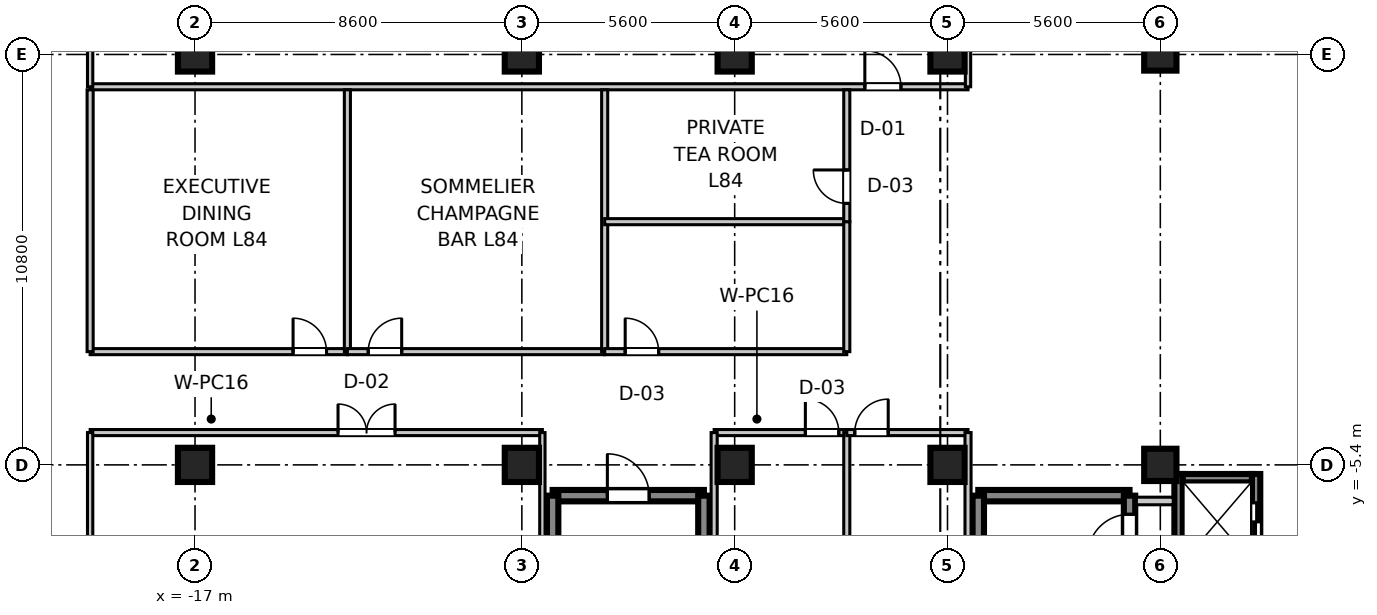
"""IFC4 building model, lengths in metres.
Left out: names, types, materials, properties, quantities, classifications, styles, units other than length and angle.
Written with IfcOpenShell. Run it as: python <this file> out.ifc"""

import sys

from ifc_helpers import new_model, si_unit, direction, frame, frame_2d, origin, origin_2d, place, context, subcontext, project, spatial, rectangle, extrude, source, transform, mapped, element, fill, save


model = new_model("IFC4")
c1 = context("Model", 3, precision=1e-05, world=origin(), true_north=direction((0.0, 1.0)))
c2 = subcontext(c1, "Body", "Model", "MODEL_VIEW")
j1 = project(units=[si_unit("LENGTHUNIT", "METRE"), si_unit("PLANEANGLEUNIT", "RADIAN")], contexts=[c1])
p1 = place(None, origin())
s1 = spatial("IfcSite", under=j1, at=p1, CompositionType="ELEMENT")
p2 = place(p1, origin())
s2 = spatial("IfcBuilding", under=s1, at=p2, CompositionType="ELEMENT")
p3 = place(p2, frame((0.0, 0.0, 327.15)))
s3 = spatial("IfcBuildingStorey", under=s2, at=p3, CompositionType="ELEMENT", Elevation=327.15)
m1 = source(origin(), c2, "Body", "SweptSolid", [
    extrude(rectangle(XDim=0.9, YDim=0.9, at=origin_2d()), origin(), (0.0, 0.0, 1.0), 3.755),
])
for number, where, z_axis, x_axis in (
    (1, (-17.0, -5.4, 0.0), (0.0, 0.0, 1.0), (1.0, 0.0, 0.0)),
    (2, (-17.0, 5.4, 0.0), (0.0, 0.0, 1.0), (1.0, 0.0, 0.0)),
    (3, (-8.4, -5.4, 0.0), (0.0, 0.0, 1.0), (1.0, 0.0, 0.0)),
    (4, (-8.4, 5.4, 0.0), (0.0, 0.0, 1.0), (1.0, 0.0, 0.0)),
    (5, (-2.8, -5.4, 0.0), (0.0, 0.0, 1.0), (1.0, 0.0, 0.0)),
    (6, (-2.8, 5.4, 0.0), (0.0, 0.0, 1.0), (1.0, 0.0, 0.0)),
    (7, (2.8, -5.4, 0.0), (0.0, 0.0, 1.0), (1.0, 0.0, 0.0)),
    (8, (2.8, 5.4, 0.0), (0.0, 0.0, 1.0), (1.0, 0.0, 0.0)),
):
    element("IfcColumn", number, at=place(p3, frame(where, z_axis=z_axis, x_axis=x_axis)), inside=s3, PredefinedType="COLUMN", context=c2, shape_type="MappedRepresentation", body=[
        mapped(m1, transform((0.0, 0.0, 0.0), scale=1.0)),
    ])
m2 = source(origin(), c2, "Body", "SweptSolid", [
    extrude(rectangle(XDim=0.85, YDim=0.85, at=origin_2d()), origin(), (0.0, 0.0, 1.0), 3.755),
])
for number, where, z_axis, x_axis in (
    (9, (8.4, -5.4, 0.0), (0.0, 0.0, 1.0), (1.0, 0.0, 0.0)),
    (10, (8.4, 5.4, 0.0), (0.0, 0.0, 1.0), (1.0, 0.0, 0.0)),
):
    element("IfcColumn", number, at=place(p3, frame(where, z_axis=z_axis, x_axis=x_axis)), inside=s3, PredefinedType="PILASTER", context=c2, shape_type="MappedRepresentation", body=[
        mapped(m2, transform((0.0, 0.0, 0.0), scale=1.0)),
    ])
m3 = source(origin(), c2, "Body", "SweptSolid", [
    extrude(rectangle(XDim=3.98, YDim=0.3, at=frame_2d((1.99, 0.0))), origin(), (0.0, 0.0, 1.0), 3.5),
])
p4 = place(p3, frame((3.61, -6.21, 0.0), z_axis=(0.0, 0.0, 1.0), x_axis=(1.0, 0.0, 0.0)))
e11 = element("IfcWall", 11, at=p4, inside=s3, PredefinedType="SHEAR", context=c2, shape_type="MappedRepresentation", body=[
    mapped(m3, transform((0.0, 0.0, 0.0), scale=1.0)),
])
m4 = source(origin(), c2, "Body", "SweptSolid", [
    extrude(rectangle(XDim=9.38, YDim=0.3, at=frame_2d((4.69, 0.0))), origin(), (0.0, 0.0, 1.0), 3.5),
])
p5 = place(p3, frame((3.61, -15.59, 0.0), z_axis=(0.0, 0.0, 1.0), x_axis=(0.0, 1.0, 0.0)))
e12 = element("IfcWall", 12, at=p5, inside=s3, PredefinedType="SHEAR", context=c2, shape_type="MappedRepresentation", body=[
    mapped(m4, transform((0.0, 0.0, 0.0), scale=1.0)),
])
p6 = place(p3, frame((7.59, -15.59, 0.0), z_axis=(0.0, 0.0, 1.0), x_axis=(0.0, 1.0, 0.0)))
e13 = element("IfcWall", 13, at=p6, inside=s3, PredefinedType="SHEAR", context=c2, shape_type="MappedRepresentation", body=[
    mapped(m4, transform((0.0, 0.0, 0.0), scale=1.0)),
])
p7 = place(p6, frame((7.79, 0.0, 0.0)))
e14 = element("IfcOpeningElement", 14, at=p7, cuts=e13, PredefinedType="OPENING", context=c2, shape_type="SweptSolid", body=[
    extrude(rectangle(XDim=1.1, YDim=2.15, at=frame_2d((0.55, 1.075))), frame((0.0, 0.16, 0.0), z_axis=(0.0, -1.0, 0.0), x_axis=(1.0, 0.0, 0.0)), (0.0, 0.0, 1.0), 0.32),
])
p8 = place(p3, frame((-7.59, -6.21, 0.0), z_axis=(0.0, 0.0, 1.0), x_axis=(1.0, 0.0, 0.0)))
e15 = element("IfcWall", 15, at=p8, inside=s3, PredefinedType="SHEAR", context=c2, shape_type="MappedRepresentation", body=[
    mapped(m3, transform((0.0, 0.0, 0.0), scale=1.0)),
])
p9 = place(p8, frame((1.44, 0.0, 0.0)))
e16 = element("IfcOpeningElement", 16, at=p9, cuts=e15, PredefinedType="OPENING", context=c2, shape_type="SweptSolid", body=[
    extrude(rectangle(XDim=1.1, YDim=2.15, at=frame_2d((0.55, 1.075))), frame((0.0, 0.16, 0.0), z_axis=(0.0, -1.0, 0.0), x_axis=(1.0, 0.0, 0.0)), (0.0, 0.0, 1.0), 0.32),
])
for number, where, z_axis, x_axis in (
    (17, (-7.59, -15.59, 0.0), (0.0, 0.0, 1.0), (0.0, 1.0, 0.0)),
    (18, (-3.61, -15.59, 0.0), (0.0, 0.0, 1.0), (0.0, 1.0, 0.0)),
):
    element("IfcWall", number, at=place(p3, frame(where, z_axis=z_axis, x_axis=x_axis)), inside=s3, PredefinedType="SHEAR", context=c2, shape_type="MappedRepresentation", body=[
        mapped(m4, transform((0.0, 0.0, 0.0), scale=1.0)),
    ])
m5 = source(origin(), c2, "Body", "SweptSolid", [
    extrude(rectangle(XDim=2.36, YDim=0.22, at=frame_2d((1.18, 0.0))), origin(), (0.0, 0.0, 1.0), 3.5),
])
p10 = place(p3, frame((8.88, -8.0, 0.0), z_axis=(0.0, 0.0, 1.0), x_axis=(0.0, 1.0, 0.0)))
e19 = element("IfcWall", 19, at=p10, inside=s3, PredefinedType="SHEAR", context=c2, shape_type="MappedRepresentation", body=[
    mapped(m5, transform((0.0, 0.0, 0.0), scale=1.0)),
])
p11 = place(p3, frame((10.92, -8.0, 0.0), z_axis=(0.0, 0.0, 1.0), x_axis=(0.0, 1.0, 0.0)))
e20 = element("IfcWall", 20, at=p11, inside=s3, PredefinedType="SHEAR", context=c2, shape_type="MappedRepresentation", body=[
    mapped(m5, transform((0.0, 0.0, 0.0), scale=1.0)),
])
p12 = place(p11, frame((0.6, 0.0, 0.0)))
e21 = element("IfcOpeningElement", 21, at=p12, cuts=e20, PredefinedType="OPENING", context=c2, shape_type="SweptSolid", body=[
    extrude(rectangle(XDim=1.0, YDim=2.2, at=frame_2d((0.5, 1.1))), frame((0.0, 0.12, 0.0), z_axis=(0.0, -1.0, 0.0), x_axis=(1.0, 0.0, 0.0)), (0.0, 0.0, 1.0), 0.24),
])
m6 = source(origin(), c2, "Body", "SweptSolid", [
    extrude(rectangle(XDim=1.82, YDim=0.22, at=frame_2d((0.91, 0.0))), origin(), (0.0, 0.0, 1.0), 3.5),
])
p13 = place(p3, frame((8.99, -5.75, 0.0), z_axis=(0.0, 0.0, 1.0), x_axis=(1.0, 0.0, 0.0)))
e22 = element("IfcWall", 22, at=p13, inside=s3, PredefinedType="SHEAR", context=c2, shape_type="MappedRepresentation", body=[
    mapped(m6, transform((0.0, 0.0, 0.0), scale=1.0)),
])
m7 = source(origin(), c2, "Body", "SweptSolid", [
    extrude(rectangle(XDim=0.97, YDim=0.2, at=frame_2d((0.485, 0.0))), origin(), (0.0, 0.0, 1.0), 2.84),
])
p14 = place(p3, frame((7.77, -6.35, 0.0), z_axis=(0.0, 0.0, 1.0), x_axis=(1.0, 0.0, 0.0)))
e23 = element("IfcWall", 23, at=p14, inside=s3, PredefinedType="PARTITIONING", context=c2, shape_type="MappedRepresentation", body=[
    mapped(m7, transform((0.0, 0.0, 0.0), scale=1.0)),
])
m8 = source(origin(), c2, "Body", "SweptSolid", [
    extrude(rectangle(XDim=23.1, YDim=0.16, at=frame_2d((11.55, 0.0))), origin(), (0.0, 0.0, 1.0), 2.84),
])
p15 = place(p3, frame((-19.76, 4.55, 0.0), z_axis=(0.0, 0.0, 1.0), x_axis=(1.0, 0.0, 0.0)))
e24 = element("IfcWall", 24, at=p15, inside=s3, PredefinedType="PARTITIONING", context=c2, shape_type="MappedRepresentation", body=[
    mapped(m8, transform((0.0, 0.0, 0.0), scale=1.0)),
])
p16 = place(p15, frame((20.385, 0.0, 0.0)))
e25 = element("IfcOpeningElement", 25, at=p16, cuts=e24, PredefinedType="OPENING", context=c2, shape_type="SweptSolid", body=[
    extrude(rectangle(XDim=0.95, YDim=2.1, at=frame_2d((0.475, 1.05))), frame((0.0, 0.09, 0.0), z_axis=(0.0, -1.0, 0.0), x_axis=(1.0, 0.0, 0.0)), (0.0, 0.0, 1.0), 0.18),
])
m9 = source(origin(), c2, "Body", "SweptSolid", [
    extrude(rectangle(XDim=16.53, YDim=0.14, at=frame_2d((8.265, 0.0))), origin(), (0.0, 0.0, 1.0), 2.84),
])
p17 = place(p3, frame((-19.76, 4.55, 0.0), z_axis=(0.0, 0.0, 1.0), x_axis=(0.0, 1.0, 0.0)))
e26 = element("IfcWall", 26, at=p17, inside=s3, PredefinedType="PARTITIONING", context=c2, shape_type="MappedRepresentation", body=[
    mapped(m9, transform((0.0, 0.0, 0.0), scale=1.0)),
])
m10 = source(origin(), c2, "Body", "SweptSolid", [
    extrude(rectangle(XDim=17.95, YDim=0.14, at=frame_2d((8.975, 0.0))), origin(), (0.0, 0.0, 1.0), 2.84),
])
p18 = place(p3, frame((3.34, 4.55, 0.0), z_axis=(0.0, 0.0, 1.0), x_axis=(0.0, 1.0, 0.0)))
e27 = element("IfcWall", 27, at=p18, inside=s3, PredefinedType="PARTITIONING", context=c2, shape_type="MappedRepresentation", body=[
    mapped(m10, transform((0.0, 0.0, 0.0), scale=1.0)),
])
m11 = source(origin(), c2, "Body", "SweptSolid", [
    extrude(rectangle(XDim=11.9, YDim=0.16, at=frame_2d((5.95, 0.0))), origin(), (0.0, 0.0, 1.0), 2.84),
])
p19 = place(p3, frame((-19.76, -4.55, 0.0), z_axis=(0.0, 0.0, 1.0), x_axis=(1.0, 0.0, 0.0)))
e28 = element("IfcWall", 28, at=p19, inside=s3, PredefinedType="PARTITIONING", context=c2, shape_type="MappedRepresentation", body=[
    mapped(m11, transform((0.0, 0.0, 0.0), scale=1.0)),
])
p20 = place(p19, frame((6.523, 0.0, 0.0)))
e29 = element("IfcOpeningElement", 29, at=p20, cuts=e28, PredefinedType="OPENING", context=c2, shape_type="SweptSolid", body=[
    extrude(rectangle(XDim=1.5, YDim=2.15, at=frame_2d((0.75, 1.075))), frame((0.0, 0.09, 0.0), z_axis=(0.0, -1.0, 0.0), x_axis=(1.0, 0.0, 0.0)), (0.0, 0.0, 1.0), 0.18),
])
p21 = place(p3, frame((-19.76, -21.08, 0.0), z_axis=(0.0, 0.0, 1.0), x_axis=(0.0, 1.0, 0.0)))
e30 = element("IfcWall", 30, at=p21, inside=s3, PredefinedType="PARTITIONING", context=c2, shape_type="MappedRepresentation", body=[
    mapped(m9, transform((0.0, 0.0, 0.0), scale=1.0)),
])
p22 = place(p3, frame((-7.86, -22.5, 0.0), z_axis=(0.0, 0.0, 1.0), x_axis=(0.0, 1.0, 0.0)))
e31 = element("IfcWall", 31, at=p22, inside=s3, PredefinedType="PARTITIONING", context=c2, shape_type="MappedRepresentation", body=[
    mapped(m10, transform((0.0, 0.0, 0.0), scale=1.0)),
])
m12 = source(origin(), c2, "Body", "SweptSolid", [
    extrude(rectangle(XDim=3.49, YDim=0.16, at=frame_2d((1.745, 0.0))), origin(), (0.0, 0.0, 1.0), 2.84),
])
p23 = place(p3, frame((-3.34, -4.55, 0.0), z_axis=(0.0, 0.0, 1.0), x_axis=(1.0, 0.0, 0.0)))
e32 = element("IfcWall", 32, at=p23, inside=s3, PredefinedType="PARTITIONING", context=c2, shape_type="MappedRepresentation", body=[
    mapped(m12, transform((0.0, 0.0, 0.0), scale=1.0)),
])
p24 = place(p23, frame((2.4, 0.0, 0.0)))
e33 = element("IfcOpeningElement", 33, at=p24, cuts=e32, PredefinedType="OPENING", context=c2, shape_type="SweptSolid", body=[
    extrude(rectangle(XDim=0.88, YDim=2.1, at=frame_2d((0.44, 1.05))), frame((0.0, 0.09, 0.0), z_axis=(0.0, -1.0, 0.0), x_axis=(1.0, 0.0, 0.0)), (0.0, 0.0, 1.0), 0.18),
])
m13 = source(origin(), c2, "Body", "SweptSolid", [
    extrude(rectangle(XDim=17.95, YDim=0.16, at=frame_2d((8.975, 0.0))), origin(), (0.0, 0.0, 1.0), 2.84),
])
for number, where, z_axis, x_axis in (
    (34, (-3.34, -22.5, 0.0), (0.0, 0.0, 1.0), (0.0, 1.0, 0.0)),
    (35, (0.15, -22.5, 0.0), (0.0, 0.0, 1.0), (0.0, 1.0, 0.0)),
):
    element("IfcWall", number, at=place(p3, frame(where, z_axis=z_axis, x_axis=x_axis)), inside=s3, PredefinedType="PARTITIONING", context=c2, shape_type="MappedRepresentation", body=[
        mapped(m13, transform((0.0, 0.0, 0.0), scale=1.0)),
    ])
m14 = source(origin(), c2, "Body", "SweptSolid", [
    extrude(rectangle(XDim=3.19, YDim=0.16, at=frame_2d((1.595, 0.0))), origin(), (0.0, 0.0, 1.0), 2.84),
])
p25 = place(p3, frame((0.15, -4.55, 0.0), z_axis=(0.0, 0.0, 1.0), x_axis=(1.0, 0.0, 0.0)))
e36 = element("IfcWall", 36, at=p25, inside=s3, PredefinedType="PARTITIONING", context=c2, shape_type="MappedRepresentation", body=[
    mapped(m14, transform((0.0, 0.0, 0.0), scale=1.0)),
])
p26 = place(p25, frame((0.21, 0.0, 0.0)))
e37 = element("IfcOpeningElement", 37, at=p26, cuts=e36, PredefinedType="OPENING", context=c2, shape_type="SweptSolid", body=[
    extrude(rectangle(XDim=0.88, YDim=2.1, at=frame_2d((0.44, 1.05))), frame((0.0, 0.09, 0.0), z_axis=(0.0, -1.0, 0.0), x_axis=(1.0, 0.0, 0.0)), (0.0, 0.0, 1.0), 0.18),
])
p27 = place(p3, frame((3.34, -22.5, 0.0), z_axis=(0.0, 0.0, 1.0), x_axis=(0.0, 1.0, 0.0)))
e38 = element("IfcWall", 38, at=p27, inside=s3, PredefinedType="PARTITIONING", context=c2, shape_type="MappedRepresentation", body=[
    mapped(m13, transform((0.0, 0.0, 0.0), scale=1.0)),
])
m15 = source(origin(), c2, "Body", "SweptSolid", [
    extrude(rectangle(XDim=6.769, YDim=0.16, at=frame_2d((3.385, 0.0))), origin(), (0.0, 0.0, 1.0), 2.84),
])
p28 = place(p3, frame((-19.76, -2.42, 0.0), z_axis=(0.0, 0.0, 1.0), x_axis=(1.0, 0.0, 0.0)))
e39 = element("IfcWall", 39, at=p28, inside=s3, PredefinedType="PARTITIONING", context=c2, shape_type="MappedRepresentation", body=[
    mapped(m15, transform((0.0, 0.0, 0.0), scale=1.0)),
])
p29 = place(p28, frame((5.34, 0.0, 0.0)))
e40 = element("IfcOpeningElement", 40, at=p29, cuts=e39, PredefinedType="OPENING", context=c2, shape_type="SweptSolid", body=[
    extrude(rectangle(XDim=0.88, YDim=2.1, at=frame_2d((0.44, 1.05))), frame((0.0, 0.09, 0.0), z_axis=(0.0, -1.0, 0.0), x_axis=(1.0, 0.0, 0.0)), (0.0, 0.0, 1.0), 0.18),
])
m16 = source(origin(), c2, "Body", "SweptSolid", [
    extrude(rectangle(XDim=6.89, YDim=0.16, at=frame_2d((3.445, 0.0))), origin(), (0.0, 0.0, 1.0), 2.84),
])
for number, where, z_axis, x_axis in (
    (41, (-19.76, -2.42, 0.0), (0.0, 0.0, 1.0), (0.0, 1.0, 0.0)),
    (42, (-12.991, -2.42, 0.0), (0.0, 0.0, 1.0), (0.0, 1.0, 0.0)),
):
    element("IfcWall", number, at=place(p3, frame(where, z_axis=z_axis, x_axis=x_axis)), inside=s3, PredefinedType="PARTITIONING", context=c2, shape_type="MappedRepresentation", body=[
        mapped(m16, transform((0.0, 0.0, 0.0), scale=1.0)),
    ])
m17 = source(origin(), c2, "Body", "SweptSolid", [
    extrude(rectangle(XDim=6.77, YDim=0.16, at=frame_2d((3.385, 0.0))), origin(), (0.0, 0.0, 1.0), 2.84),
])
p30 = place(p3, frame((-12.991, -2.42, 0.0), z_axis=(0.0, 0.0, 1.0), x_axis=(1.0, 0.0, 0.0)))
e43 = element("IfcWall", 43, at=p30, inside=s3, PredefinedType="PARTITIONING", context=c2, shape_type="MappedRepresentation", body=[
    mapped(m17, transform((0.0, 0.0, 0.0), scale=1.0)),
])
p31 = place(p30, frame((0.549, 0.0, 0.0)))
e44 = element("IfcOpeningElement", 44, at=p31, cuts=e43, PredefinedType="OPENING", context=c2, shape_type="SweptSolid", body=[
    extrude(rectangle(XDim=0.88, YDim=2.1, at=frame_2d((0.44, 1.05))), frame((0.0, 0.09, 0.0), z_axis=(0.0, -1.0, 0.0), x_axis=(1.0, 0.0, 0.0)), (0.0, 0.0, 1.0), 0.18),
])
p32 = place(p3, frame((-6.221, -2.42, 0.0), z_axis=(0.0, 0.0, 1.0), x_axis=(0.0, 1.0, 0.0)))
e45 = element("IfcWall", 45, at=p32, inside=s3, PredefinedType="PARTITIONING", context=c2, shape_type="MappedRepresentation", body=[
    mapped(m16, transform((0.0, 0.0, 0.0), scale=1.0)),
])
m18 = source(origin(), c2, "Body", "SweptSolid", [
    extrude(rectangle(XDim=6.371, YDim=0.16, at=frame_2d((3.186, 0.0))), origin(), (0.0, 0.0, 1.0), 2.84),
])
p33 = place(p3, frame((-6.221, -2.42, 0.0), z_axis=(0.0, 0.0, 1.0), x_axis=(1.0, 0.0, 0.0)))
e46 = element("IfcWall", 46, at=p33, inside=s3, PredefinedType="PARTITIONING", context=c2, shape_type="MappedRepresentation", body=[
    mapped(m18, transform((0.0, 0.0, 0.0), scale=1.0)),
])
p34 = place(p33, frame((0.54, 0.0, 0.0)))
e47 = element("IfcOpeningElement", 47, at=p34, cuts=e46, PredefinedType="OPENING", context=c2, shape_type="SweptSolid", body=[
    extrude(rectangle(XDim=0.88, YDim=2.1, at=frame_2d((0.44, 1.05))), frame((0.0, 0.09, 0.0), z_axis=(0.0, -1.0, 0.0), x_axis=(1.0, 0.0, 0.0)), (0.0, 0.0, 1.0), 0.18),
])
p35 = place(p3, frame((-6.221, 1.0, 0.0), z_axis=(0.0, 0.0, 1.0), x_axis=(1.0, 0.0, 0.0)))
e48 = element("IfcWall", 48, at=p35, inside=s3, PredefinedType="PARTITIONING", context=c2, shape_type="MappedRepresentation", body=[
    mapped(m18, transform((0.0, 0.0, 0.0), scale=1.0)),
])
m19 = source(origin(), c2, "Body", "SweptSolid", [
    extrude(rectangle(XDim=3.42, YDim=0.16, at=frame_2d((1.71, 0.0))), origin(), (0.0, 0.0, 1.0), 2.84),
])
p36 = place(p3, frame((0.15, -2.42, 0.0), z_axis=(0.0, 0.0, 1.0), x_axis=(0.0, 1.0, 0.0)))
e49 = element("IfcWall", 49, at=p36, inside=s3, PredefinedType="PARTITIONING", context=c2, shape_type="MappedRepresentation", body=[
    mapped(m19, transform((0.0, 0.0, 0.0), scale=1.0)),
])
m20 = source(origin(), c2, "Body", "SweptSolid", [
    extrude(rectangle(XDim=3.47, YDim=0.16, at=frame_2d((1.735, 0.0))), origin(), (0.0, 0.0, 1.0), 2.84),
])
p37 = place(p3, frame((0.15, 1.0, 0.0), z_axis=(0.0, 0.0, 1.0), x_axis=(0.0, 1.0, 0.0)))
e50 = element("IfcWall", 50, at=p37, inside=s3, PredefinedType="PARTITIONING", context=c2, shape_type="MappedRepresentation", body=[
    mapped(m20, transform((0.0, 0.0, 0.0), scale=1.0)),
])
p38 = place(p37, frame((0.481, 0.0, 0.0)))
e51 = element("IfcOpeningElement", 51, at=p38, cuts=e50, PredefinedType="OPENING", context=c2, shape_type="SweptSolid", body=[
    extrude(rectangle(XDim=0.88, YDim=2.1, at=frame_2d((0.44, 1.05))), frame((0.0, 0.09, 0.0), z_axis=(0.0, -1.0, 0.0), x_axis=(1.0, 0.0, 0.0)), (0.0, 0.0, 1.0), 0.18),
])
m21 = source(origin(), c2, "Body", "SweptSolid", [
    extrude(rectangle(XDim=1.1, YDim=2.15, at=frame_2d((0.55, 1.075))), frame((0.0, 0.025, 0.0), z_axis=(0.0, -1.0, 0.0), x_axis=(1.0, 0.0, 0.0)), (0.0, 0.0, 1.0), 0.05),
])
p39 = place(p7, origin())
e52 = element("IfcDoor", 52, at=p39, inside=s3, OperationType="SINGLE_SWING_LEFT", PredefinedType="DOOR", context=c2, shape_type="MappedRepresentation", body=[
    mapped(m21, transform((0.0, 0.0, 0.0), scale=1.0)),
])
fill(e14, e52)
p40 = place(p9, frame((1.1, 0.0, 0.0), z_axis=(0.0, 0.0, 1.0), x_axis=(-1.0, 0.0, 0.0)))
e53 = element("IfcDoor", 53, at=p40, inside=s3, OperationType="SINGLE_SWING_LEFT", PredefinedType="DOOR", context=c2, shape_type="MappedRepresentation", body=[
    mapped(m21, transform((0.0, 0.0, 0.0), scale=1.0)),
])
fill(e16, e53)
m22 = source(origin(), c2, "Body", "SweptSolid", [
    extrude(rectangle(XDim=1.0, YDim=2.2, at=frame_2d((0.5, 1.1))), frame((0.0, 0.025, 0.0), z_axis=(0.0, -1.0, 0.0), x_axis=(1.0, 0.0, 0.0)), (0.0, 0.0, 1.0), 0.05),
])
p41 = place(p12, frame((1.0, 0.0, 0.0), z_axis=(0.0, 0.0, 1.0), x_axis=(-1.0, 0.0, 0.0)))
e54 = element("IfcDoor", 54, at=p41, inside=s3, OperationType="DOUBLE_DOOR_SLIDING", PredefinedType="DOOR", context=c2, shape_type="MappedRepresentation", body=[
    mapped(m22, transform((0.0, 0.0, 0.0), scale=1.0)),
])
fill(e21, e54)
m23 = source(origin(), c2, "Body", "SweptSolid", [
    extrude(rectangle(XDim=0.95, YDim=2.1, at=frame_2d((0.475, 1.05))), frame((0.0, 0.025, 0.0), z_axis=(0.0, -1.0, 0.0), x_axis=(1.0, 0.0, 0.0)), (0.0, 0.0, 1.0), 0.05),
])
p42 = place(p16, origin())
e55 = element("IfcDoor", 55, at=p42, inside=s3, OperationType="SINGLE_SWING_LEFT", PredefinedType="DOOR", context=c2, shape_type="MappedRepresentation", body=[
    mapped(m23, transform((0.0, 0.0, 0.0), scale=1.0)),
])
fill(e25, e55)
m24 = source(origin(), c2, "Body", "SweptSolid", [
    extrude(rectangle(XDim=1.5, YDim=2.15, at=frame_2d((0.75, 1.075))), frame((0.0, 0.025, 0.0), z_axis=(0.0, -1.0, 0.0), x_axis=(1.0, 0.0, 0.0)), (0.0, 0.0, 1.0), 0.05),
])
p43 = place(p20, frame((1.5, 0.0, 0.0), z_axis=(0.0, 0.0, 1.0), x_axis=(-1.0, 0.0, 0.0)))
e56 = element("IfcDoor", 56, at=p43, inside=s3, OperationType="DOUBLE_DOOR_SINGLE_SWING", PredefinedType="DOOR", context=c2, shape_type="MappedRepresentation", body=[
    mapped(m24, transform((0.0, 0.0, 0.0), scale=1.0)),
])
fill(e29, e56)
m25 = source(origin(), c2, "Body", "SweptSolid", [
    extrude(rectangle(XDim=0.88, YDim=2.1, at=frame_2d((0.44, 1.05))), frame((0.0, 0.025, 0.0), z_axis=(0.0, -1.0, 0.0), x_axis=(1.0, 0.0, 0.0)), (0.0, 0.0, 1.0), 0.05),
])
p44 = place(p24, frame((0.88, 0.0, 0.0), z_axis=(0.0, 0.0, 1.0), x_axis=(-1.0, 0.0, 0.0)))
e57 = element("IfcDoor", 57, at=p44, inside=s3, OperationType="SINGLE_SWING_LEFT", PredefinedType="DOOR", context=c2, shape_type="MappedRepresentation", body=[
    mapped(m25, transform((0.0, 0.0, 0.0), scale=1.0)),
])
fill(e33, e57)
p45 = place(p26, frame((0.88, 0.0, 0.0), z_axis=(0.0, 0.0, 1.0), x_axis=(-1.0, 0.0, 0.0)))
e58 = element("IfcDoor", 58, at=p45, inside=s3, OperationType="SINGLE_SWING_RIGHT", PredefinedType="DOOR", context=c2, shape_type="MappedRepresentation", body=[
    mapped(m25, transform((0.0, 0.0, 0.0), scale=1.0)),
])
fill(e37, e58)
p46 = place(p29, origin())
e59 = element("IfcDoor", 59, at=p46, inside=s3, OperationType="SINGLE_SWING_LEFT", PredefinedType="DOOR", context=c2, shape_type="MappedRepresentation", body=[
    mapped(m25, transform((0.0, 0.0, 0.0), scale=1.0)),
])
fill(e40, e59)
p47 = place(p31, origin())
e60 = element("IfcDoor", 60, at=p47, inside=s3, OperationType="SINGLE_SWING_RIGHT", PredefinedType="DOOR", context=c2, shape_type="MappedRepresentation", body=[
    mapped(m25, transform((0.0, 0.0, 0.0), scale=1.0)),
])
fill(e44, e60)
p48 = place(p34, origin())
e61 = element("IfcDoor", 61, at=p48, inside=s3, OperationType="SINGLE_SWING_LEFT", PredefinedType="DOOR", context=c2, shape_type="MappedRepresentation", body=[
    mapped(m25, transform((0.0, 0.0, 0.0), scale=1.0)),
])
fill(e47, e61)
p49 = place(p38, origin())
e62 = element("IfcDoor", 62, at=p49, inside=s3, OperationType="SINGLE_SWING_RIGHT", PredefinedType="DOOR", context=c2, shape_type="MappedRepresentation", body=[
    mapped(m25, transform((0.0, 0.0, 0.0), scale=1.0)),
])
fill(e51, e62)
save(model, sys.argv[1])
